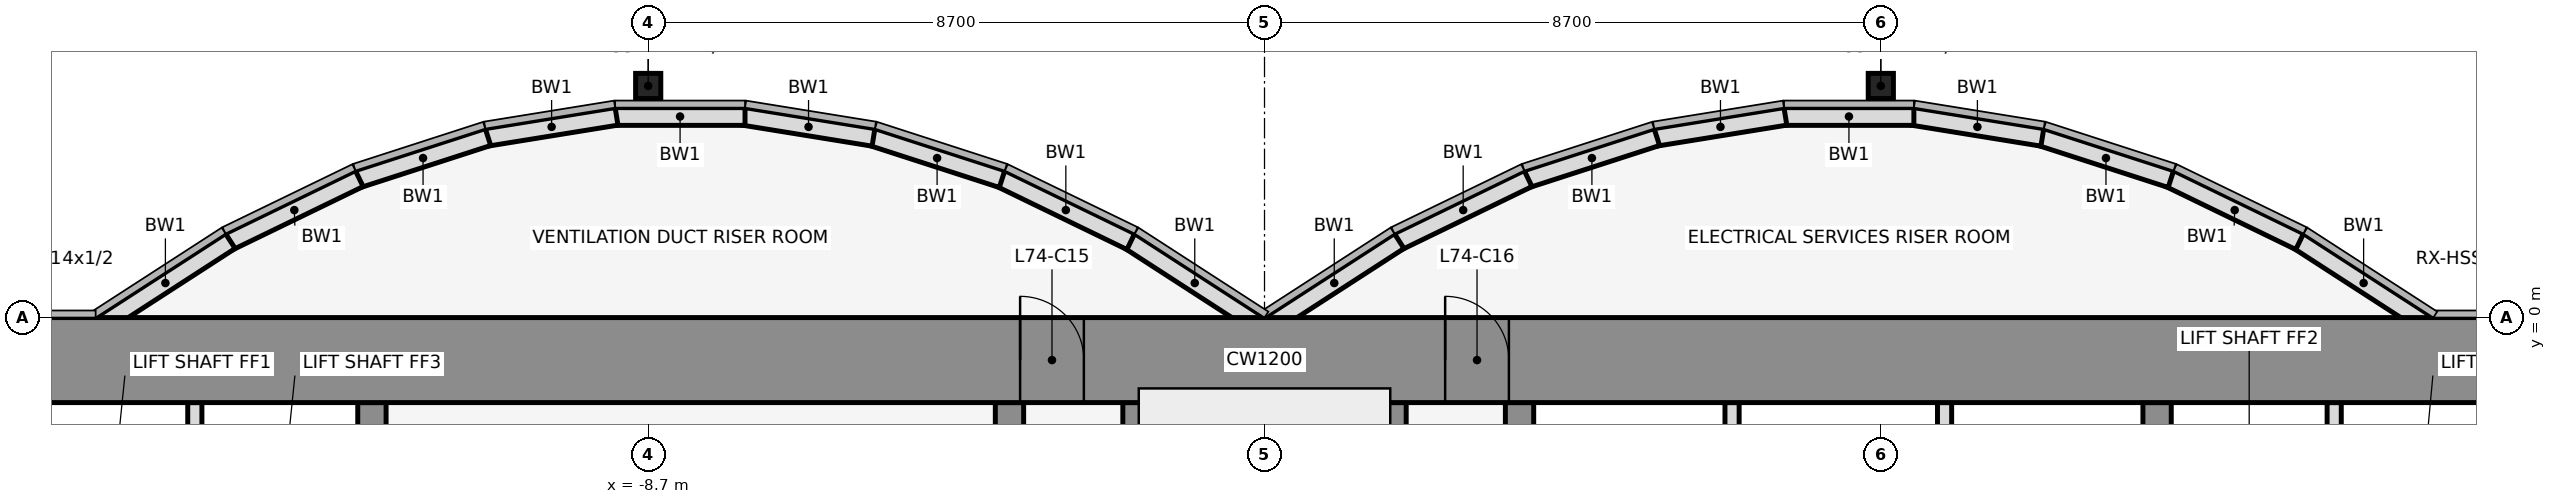
"""IFC4 building model, lengths in metres.
Left out: names, types, materials, properties, quantities, classifications, styles, units other than length and angle.
Written with IfcOpenShell. Run it as: python <this file> out.ifc"""

import sys

from ifc_helpers import new_model, si_unit, direction, frame, frame_2d, origin, origin_2d, place, context, subcontext, project, spatial, rectangle, hollow_rectangle, extrude, element, fill, save


model = new_model("IFC4")
c1 = context("Model", 3, precision=1e-05, world=origin(), true_north=direction((0.0, 1.0)))
c2 = subcontext(c1, "Body", "Model", "MODEL_VIEW")
j1 = project(units=[si_unit("LENGTHUNIT", "METRE"), si_unit("PLANEANGLEUNIT", "RADIAN")], contexts=[c1])
p1 = place(None, origin())
s1 = spatial("IfcSite", under=j1, at=p1, CompositionType="ELEMENT")
p2 = place(p1, origin())
s2 = spatial("IfcBuilding", under=s1, at=p2, CompositionType="ELEMENT")
p3 = place(p2, frame((0.0, 0.0, 329.0)))
s3 = spatial("IfcBuildingStorey", under=s2, at=p3, CompositionType="ELEMENT", Elevation=329.0)
for number, where, z_axis, x_axis in (
    (1, (-8.7, 3.269, 0.0), (0.0, 0.0, 1.0), (1.0, 0.0, 0.0)),
    (2, (8.7, 3.269, 0.0), (0.0, 0.0, 1.0), (1.0, 0.0, 0.0)),
):
    element("IfcColumn", number, at=place(p3, frame(where, z_axis=z_axis, x_axis=x_axis)), inside=s3, PredefinedType="COLUMN", context=c2, shape_type="SweptSolid", body=[
        extrude(hollow_rectangle(XDim=0.356, YDim=0.356, WallThickness=0.012, at=origin_2d()), origin(), (0.0, 0.0, 1.0), 4.5),
    ])
p4 = place(p3, frame((16.432, -0.105, 0.0), z_axis=(0.0, 0.0, 1.0), x_axis=(-0.83981312244, 0.542875602121, 0.0)))
e3 = element("IfcWall", 3, at=p4, inside=s3, PredefinedType="STANDARD", context=c2, shape_type="SweptSolid", body=[
    extrude(rectangle(XDim=2.183, YDim=0.25, at=frame_2d((1.091, 0.0))), origin(), (0.0, 0.0, 1.0), 4.35),
])
p5 = place(p3, frame((14.612, 1.073, 0.0), z_axis=(0.0, 0.0, 1.0), x_axis=(-0.89982408427, 0.436252928206, 0.0)))
e4 = element("IfcWall", 4, at=p5, inside=s3, PredefinedType="STANDARD", context=c2, shape_type="SweptSolid", body=[
    extrude(rectangle(XDim=2.038, YDim=0.25, at=frame_2d((1.019, 0.0))), origin(), (0.0, 0.0, 1.0), 4.35),
])
p6 = place(p3, frame((12.795, 1.955, 0.0), z_axis=(0.0, 0.0, 1.0), x_axis=(-0.951495806175, 0.307661714928, 0.0)))
e5 = element("IfcWall", 5, at=p6, inside=s3, PredefinedType="STANDARD", context=c2, shape_type="SweptSolid", body=[
    extrude(rectangle(XDim=1.927, YDim=0.25, at=frame_2d((0.963, 0.0))), origin(), (0.0, 0.0, 1.0), 4.35),
])
p7 = place(p3, frame((10.98, 2.543, 0.0), z_axis=(0.0, 0.0, 1.0), x_axis=(-0.987181718931, 0.159600293885, 0.0)))
e6 = element("IfcWall", 6, at=p7, inside=s3, PredefinedType="STANDARD", context=c2, shape_type="SweptSolid", body=[
    extrude(rectangle(XDim=1.857, YDim=0.25, at=frame_2d((0.929, 0.0))), origin(), (0.0, 0.0, 1.0), 4.35),
])
p8 = place(p3, frame((9.167, 2.838, 0.0), z_axis=(0.0, 0.0, 1.0), x_axis=(-1.0, 0.0, 0.0)))
e7 = element("IfcWall", 7, at=p8, inside=s3, PredefinedType="STANDARD", context=c2, shape_type="SweptSolid", body=[
    extrude(rectangle(XDim=1.833, YDim=0.25, at=frame_2d((0.917, 0.0))), origin(), (0.0, 0.0, 1.0), 4.35),
])
p9 = place(p3, frame((7.353, 2.84, 0.0), z_axis=(0.0, 0.0, 1.0), x_axis=(-0.987181718931, -0.159600293885, 0.0)))
e8 = element("IfcWall", 8, at=p9, inside=s3, PredefinedType="STANDARD", context=c2, shape_type="SweptSolid", body=[
    extrude(rectangle(XDim=1.857, YDim=0.25, at=frame_2d((0.929, 0.0))), origin(), (0.0, 0.0, 1.0), 4.35),
])
p10 = place(p3, frame((5.538, 2.548, 0.0), z_axis=(0.0, 0.0, 1.0), x_axis=(-0.951495806175, -0.307661714928, 0.0)))
e9 = element("IfcWall", 9, at=p10, inside=s3, PredefinedType="STANDARD", context=c2, shape_type="SweptSolid", body=[
    extrude(rectangle(XDim=1.927, YDim=0.25, at=frame_2d((0.963, 0.0))), origin(), (0.0, 0.0, 1.0), 4.35),
])
p11 = place(p3, frame((3.721, 1.962, 0.0), z_axis=(0.0, 0.0, 1.0), x_axis=(-0.89982408427, -0.436252928206, 0.0)))
e10 = element("IfcWall", 10, at=p11, inside=s3, PredefinedType="STANDARD", context=c2, shape_type="SweptSolid", body=[
    extrude(rectangle(XDim=2.038, YDim=0.25, at=frame_2d((1.019, 0.0))), origin(), (0.0, 0.0, 1.0), 4.35),
])
for number, where, z_axis, x_axis in (
    (11, (1.901, 1.08, 0.0), (0.0, 0.0, 1.0), (-0.84, -0.543, 0.0)),
    (12, (-0.068, -0.105, 0.0), (0.0, 0.0, 1.0), (-0.84, 0.543, 0.0)),
):
    element("IfcWall", number, at=place(p3, frame(where, z_axis=z_axis, x_axis=x_axis)), inside=s3, PredefinedType="STANDARD", context=c2, shape_type="SweptSolid", body=[
        extrude(rectangle(XDim=2.183, YDim=0.25, at=frame_2d((1.091, 0.0))), origin(), (0.0, 0.0, 1.0), 4.35),
    ])
p12 = place(p3, frame((-1.888, 1.073, 0.0), z_axis=(0.0, 0.0, 1.0), x_axis=(-0.89982408427, 0.436252928206, 0.0)))
e13 = element("IfcWall", 13, at=p12, inside=s3, PredefinedType="STANDARD", context=c2, shape_type="SweptSolid", body=[
    extrude(rectangle(XDim=2.038, YDim=0.25, at=frame_2d((1.019, 0.0))), origin(), (0.0, 0.0, 1.0), 4.35),
])
p13 = place(p3, frame((-3.705, 1.955, 0.0), z_axis=(0.0, 0.0, 1.0), x_axis=(-0.951495806175, 0.307661714928, 0.0)))
e14 = element("IfcWall", 14, at=p13, inside=s3, PredefinedType="STANDARD", context=c2, shape_type="SweptSolid", body=[
    extrude(rectangle(XDim=1.927, YDim=0.25, at=frame_2d((0.963, 0.0))), origin(), (0.0, 0.0, 1.0), 4.35),
])
p14 = place(p3, frame((-5.52, 2.543, 0.0), z_axis=(0.0, 0.0, 1.0), x_axis=(-0.987181718931, 0.159600293885, 0.0)))
e15 = element("IfcWall", 15, at=p14, inside=s3, PredefinedType="STANDARD", context=c2, shape_type="SweptSolid", body=[
    extrude(rectangle(XDim=1.857, YDim=0.25, at=frame_2d((0.929, 0.0))), origin(), (0.0, 0.0, 1.0), 4.35),
])
p15 = place(p3, frame((-7.333, 2.838, 0.0), z_axis=(0.0, 0.0, 1.0), x_axis=(-1.0, 0.0, 0.0)))
e16 = element("IfcWall", 16, at=p15, inside=s3, PredefinedType="STANDARD", context=c2, shape_type="SweptSolid", body=[
    extrude(rectangle(XDim=1.833, YDim=0.25, at=frame_2d((0.917, 0.0))), origin(), (0.0, 0.0, 1.0), 4.35),
])
p16 = place(p3, frame((-9.147, 2.84, 0.0), z_axis=(0.0, 0.0, 1.0), x_axis=(-0.987181718931, -0.159600293885, 0.0)))
e17 = element("IfcWall", 17, at=p16, inside=s3, PredefinedType="STANDARD", context=c2, shape_type="SweptSolid", body=[
    extrude(rectangle(XDim=1.857, YDim=0.25, at=frame_2d((0.929, 0.0))), origin(), (0.0, 0.0, 1.0), 4.35),
])
p17 = place(p3, frame((-10.962, 2.548, 0.0), z_axis=(0.0, 0.0, 1.0), x_axis=(-0.951495806175, -0.307661714928, 0.0)))
e18 = element("IfcWall", 18, at=p17, inside=s3, PredefinedType="STANDARD", context=c2, shape_type="SweptSolid", body=[
    extrude(rectangle(XDim=1.927, YDim=0.25, at=frame_2d((0.963, 0.0))), origin(), (0.0, 0.0, 1.0), 4.35),
])
p18 = place(p3, frame((-12.779, 1.962, 0.0), z_axis=(0.0, 0.0, 1.0), x_axis=(-0.89982408427, -0.436252928206, 0.0)))
e19 = element("IfcWall", 19, at=p18, inside=s3, PredefinedType="STANDARD", context=c2, shape_type="SweptSolid", body=[
    extrude(rectangle(XDim=2.038, YDim=0.25, at=frame_2d((1.019, 0.0))), origin(), (0.0, 0.0, 1.0), 4.35),
])
p19 = place(p3, frame((-14.599, 1.08, 0.0), z_axis=(0.0, 0.0, 1.0), x_axis=(-0.83981312244, -0.542875602121, 0.0)))
e20 = element("IfcWall", 20, at=p19, inside=s3, PredefinedType="STANDARD", context=c2, shape_type="SweptSolid", body=[
    extrude(rectangle(XDim=2.183, YDim=0.25, at=frame_2d((1.091, 0.0))), origin(), (0.0, 0.0, 1.0), 4.35),
])
p20 = place(p3, frame((-15.1, -4.6, 0.0), z_axis=(0.0, 0.0, 1.0), x_axis=(0.0, 1.0, 0.0)))
e21 = element("IfcWall", 21, at=p20, inside=s3, PredefinedType="PARTITIONING", context=c2, shape_type="SweptSolid", body=[
    extrude(rectangle(XDim=3.4, YDim=0.2, at=frame_2d((1.7, 0.0))), origin(), (0.0, 0.0, 1.0), 3.418),
])
p21 = place(p3, frame((-12.6, -11.8, 0.0), z_axis=(0.0, 0.0, 1.0), x_axis=(0.0, 1.0, 0.0)))
e22 = element("IfcWall", 22, at=p21, inside=s3, PredefinedType="SHEAR", context=c2, shape_type="SweptSolid", body=[
    extrude(rectangle(XDim=10.6, YDim=0.4, at=frame_2d((5.3, 0.0))), origin(), (0.0, 0.0, 1.0), 4.5),
])
p22 = place(p21, frame((4.75, 0.0, 0.0)))
e23 = element("IfcOpeningElement", 23, at=p22, cuts=e22, PredefinedType="OPENING", context=c2, shape_type="SweptSolid", body=[
    extrude(rectangle(XDim=1.1, YDim=2.1, at=frame_2d((0.55, 1.05))), frame((0.0, 0.212, 0.0), z_axis=(0.0, -1.0, 0.0), x_axis=(1.0, 0.0, 0.0)), (0.0, 0.0, 1.0), 0.424),
])
p23 = place(p3, frame((-3.6, -11.8, 0.0), z_axis=(0.0, 0.0, 1.0), x_axis=(0.0, 1.0, 0.0)))
e24 = element("IfcWall", 24, at=p23, inside=s3, PredefinedType="SHEAR", context=c2, shape_type="SweptSolid", body=[
    extrude(rectangle(XDim=10.6, YDim=0.4, at=frame_2d((5.3, 0.0))), origin(), (0.0, 0.0, 1.0), 4.5),
])
p24 = place(p23, frame((4.85, 0.0, 0.0)))
e25 = element("IfcOpeningElement", 25, at=p24, cuts=e24, PredefinedType="OPENING", context=c2, shape_type="SweptSolid", body=[
    extrude(rectangle(XDim=0.9, YDim=2.1, at=frame_2d((0.45, 1.05))), frame((0.0, 0.212, 0.0), z_axis=(0.0, -1.0, 0.0), x_axis=(1.0, 0.0, 0.0)), (0.0, 0.0, 1.0), 0.424),
])
for number, where, z_axis, x_axis in (
    (26, (-1.8, -11.8, 0.0), (0.0, 0.0, 1.0), (0.0, 1.0, 0.0)),
    (27, (1.8, -11.8, 0.0), (0.0, 0.0, 1.0), (0.0, 1.0, 0.0)),
):
    element("IfcWall", number, at=place(p3, frame(where, z_axis=z_axis, x_axis=x_axis)), inside=s3, PredefinedType="SHEAR", context=c2, shape_type="SweptSolid", body=[
        extrude(rectangle(XDim=10.6, YDim=0.4, at=frame_2d((5.3, 0.0))), origin(), (0.0, 0.0, 1.0), 4.5),
    ])
p25 = place(p3, frame((3.6, -11.8, 0.0), z_axis=(0.0, 0.0, 1.0), x_axis=(0.0, 1.0, 0.0)))
e28 = element("IfcWall", 28, at=p25, inside=s3, PredefinedType="SHEAR", context=c2, shape_type="SweptSolid", body=[
    extrude(rectangle(XDim=10.6, YDim=0.4, at=frame_2d((5.3, 0.0))), origin(), (0.0, 0.0, 1.0), 4.5),
])
p26 = place(p25, frame((1.35, 0.0, 0.0)))
e29 = element("IfcOpeningElement", 29, at=p26, cuts=e28, PredefinedType="OPENING", context=c2, shape_type="SweptSolid", body=[
    extrude(rectangle(XDim=0.9, YDim=2.1, at=frame_2d((0.45, 1.05))), frame((0.0, 0.212, 0.0), z_axis=(0.0, -1.0, 0.0), x_axis=(1.0, 0.0, 0.0)), (0.0, 0.0, 1.0), 0.424),
])
for number, where, z_axis, x_axis in (
    (30, (6.6, -4.6, 0.0), (0.0, 0.0, 1.0), (0.0, 1.0, 0.0)),
    (31, (9.6, -4.6, 0.0), (0.0, 0.0, 1.0), (0.0, 1.0, 0.0)),
):
    element("IfcWall", number, at=place(p3, frame(where, z_axis=z_axis, x_axis=x_axis)), inside=s3, PredefinedType="PARTITIONING", context=c2, shape_type="SweptSolid", body=[
        extrude(rectangle(XDim=3.4, YDim=0.2, at=frame_2d((1.7, 0.0))), origin(), (0.0, 0.0, 1.0), 3.418),
    ])
p27 = place(p3, frame((12.6, -11.8, 0.0), z_axis=(0.0, 0.0, 1.0), x_axis=(0.0, 1.0, 0.0)))
e32 = element("IfcWall", 32, at=p27, inside=s3, PredefinedType="SHEAR", context=c2, shape_type="SweptSolid", body=[
    extrude(rectangle(XDim=10.6, YDim=0.4, at=frame_2d((5.3, 0.0))), origin(), (0.0, 0.0, 1.0), 4.5),
])
p28 = place(p27, frame((4.75, 0.0, 0.0)))
e33 = element("IfcOpeningElement", 33, at=p28, cuts=e32, PredefinedType="OPENING", context=c2, shape_type="SweptSolid", body=[
    extrude(rectangle(XDim=1.1, YDim=2.1, at=frame_2d((0.55, 1.05))), frame((0.0, 0.212, 0.0), z_axis=(0.0, -1.0, 0.0), x_axis=(1.0, 0.0, 0.0)), (0.0, 0.0, 1.0), 0.424),
])
p29 = place(p3, frame((15.1, -4.6, 0.0), z_axis=(0.0, 0.0, 1.0), x_axis=(0.0, 1.0, 0.0)))
e34 = element("IfcWall", 34, at=p29, inside=s3, PredefinedType="PARTITIONING", context=c2, shape_type="SweptSolid", body=[
    extrude(rectangle(XDim=3.4, YDim=0.2, at=frame_2d((1.7, 0.0))), origin(), (0.0, 0.0, 1.0), 3.418),
])
p30 = place(p3, frame((-22.0, -0.6, 0.0), z_axis=(0.0, 0.0, 1.0), x_axis=(1.0, 0.0, 0.0)))
e35 = element("IfcWall", 35, at=p30, inside=s3, PredefinedType="SHEAR", context=c2, shape_type="SweptSolid", body=[
    extrude(rectangle(XDim=44.0, YDim=1.2, at=frame_2d((22.0, 0.0))), origin(), (0.0, 0.0, 1.0), 4.5),
])
p31 = place(p30, frame((18.55, 0.0, 0.0)))
e36 = element("IfcOpeningElement", 36, at=p31, cuts=e35, PredefinedType="OPENING", context=c2, shape_type="SweptSolid", body=[
    extrude(rectangle(XDim=0.9, YDim=2.1, at=frame_2d((0.45, 1.05))), frame((0.0, 0.612, 0.0), z_axis=(0.0, -1.0, 0.0), x_axis=(1.0, 0.0, 0.0)), (0.0, 0.0, 1.0), 1.224),
])
p32 = place(p30, frame((24.55, 0.0, 0.0)))
e37 = element("IfcOpeningElement", 37, at=p32, cuts=e35, PredefinedType="OPENING", context=c2, shape_type="SweptSolid", body=[
    extrude(rectangle(XDim=0.9, YDim=2.1, at=frame_2d((0.45, 1.05))), frame((0.0, 0.612, 0.0), z_axis=(0.0, -1.0, 0.0), x_axis=(1.0, 0.0, 0.0)), (0.0, 0.0, 1.0), 1.224),
])
p33 = place(p31, origin())
e38 = element("IfcDoor", 38, at=p33, inside=s3, OperationType="SINGLE_SWING_LEFT", PredefinedType="DOOR", context=c2, shape_type="SweptSolid", body=[
    extrude(rectangle(XDim=0.9, YDim=2.1, at=frame_2d((0.45, 1.05))), frame((0.0, 0.025, 0.0), z_axis=(0.0, -1.0, 0.0), x_axis=(1.0, 0.0, 0.0)), (0.0, 0.0, 1.0), 0.05),
])
fill(e36, e38)
p34 = place(p32, origin())
e39 = element("IfcDoor", 39, at=p34, inside=s3, OperationType="SINGLE_SWING_LEFT", PredefinedType="DOOR", context=c2, shape_type="SweptSolid", body=[
    extrude(rectangle(XDim=0.9, YDim=2.1, at=frame_2d((0.45, 1.05))), frame((0.0, 0.025, 0.0), z_axis=(0.0, -1.0, 0.0), x_axis=(1.0, 0.0, 0.0)), (0.0, 0.0, 1.0), 0.05),
])
fill(e37, e39)
save(model, sys.argv[1])
